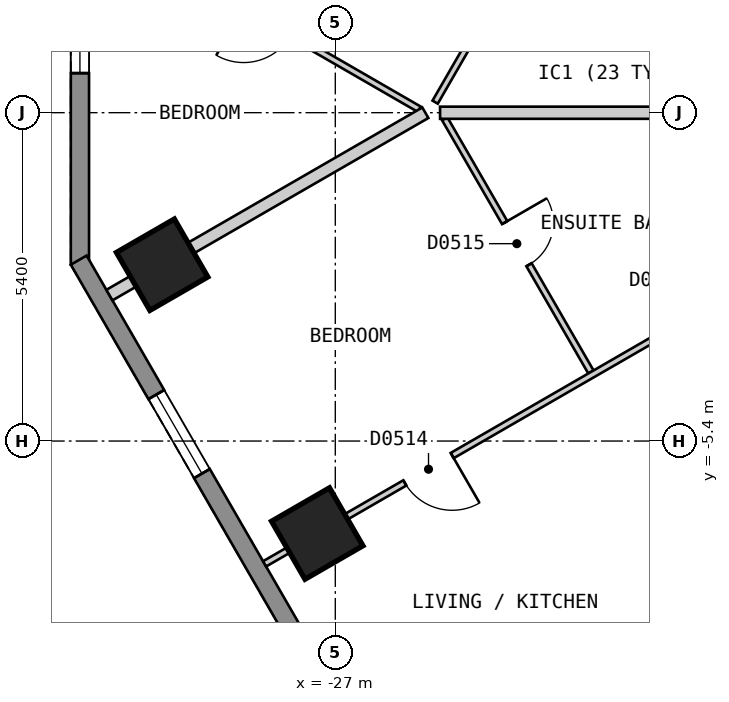
"""IFC4 building model, lengths in metres.
Left out: names, types, materials, properties, quantities, classifications, styles, units other than length and angle.
Written with IfcOpenShell. Run it as: python <this file> out.ifc"""

import sys

from ifc_helpers import new_model, si_unit, direction, frame, frame_2d, origin, origin_2d, place, context, subcontext, project, spatial, polyline, rectangle, outline, extrude, element, fill, save


model = new_model("IFC4")
c1 = context("Model", 3, precision=1e-05, world=origin(), true_north=direction((0.0, 1.0)))
c2 = subcontext(c1, "Body", "Model", "MODEL_VIEW")
j1 = project(units=[si_unit("LENGTHUNIT", "METRE"), si_unit("PLANEANGLEUNIT", "RADIAN")], contexts=[c1])
p1 = place(None, origin())
s1 = spatial("IfcSite", under=j1, at=p1, CompositionType="ELEMENT")
p2 = place(p1, origin())
s2 = spatial("IfcBuilding", under=s1, at=p2, CompositionType="ELEMENT")
p3 = place(p2, frame((0.0, 0.0, 50.4)))
s3 = spatial("IfcBuildingStorey", under=s2, at=p3, CompositionType="ELEMENT", Elevation=50.4)
for number, where, z_axis, x_axis in (
    (1, (-29.848, -2.5, 0.0), (0.0, 0.0, 1.0), (0.5, -0.866, 0.0)),
    (2, (-27.297, -6.921, 0.0), (0.0, 0.0, 1.0), (0.5, -0.866, 0.0)),
):
    element("IfcColumn", number, at=place(p3, frame(where, z_axis=z_axis, x_axis=x_axis)), inside=s3, PredefinedType="COLUMN", context=c2, shape_type="SweptSolid", body=[
        extrude(rectangle(XDim=1.1, YDim=1.1, at=origin_2d()), origin(), (0.0, 0.0, 1.0), 3.0),
    ])
p4 = place(p3, frame((-31.2, 2.5, 0.0), z_axis=(0.0, 0.0, 1.0), x_axis=(0.0, -1.0, 0.0)))
e3 = element("IfcWall", 3, at=p4, inside=s3, PredefinedType="SOLIDWALL", context=c2, shape_type="SweptSolid", body=[
    extrude(outline(polyline([(0.0, -0.15), (5.0, -0.15), (4.92, 0.15), (0.08, 0.15), (0.0, -0.15)])), origin(), (0.0, 0.0, 1.0), 2.7),
])
p5 = place(p4, frame((0.65, 0.0, 0.15)))
e4 = element("IfcOpeningElement", 4, at=p5, cuts=e3, PredefinedType="OPENING", context=c2, shape_type="SweptSolid", body=[
    extrude(rectangle(XDim=1.2, YDim=2.1, at=frame_2d((0.6, 1.05))), frame((0.0, 0.16, 0.0), z_axis=(0.0, -1.0, 0.0), x_axis=(1.0, 0.0, 0.0)), (0.0, 0.0, 1.0), 0.32),
])
p6 = place(p3, frame((-31.22, -2.425, 0.0), z_axis=(0.0, 0.0, 1.0), x_axis=(0.500001938803, -0.866024284413, 0.0)))
e5 = element("IfcWall", 5, at=p6, inside=s3, PredefinedType="SOLIDWALL", context=c2, shape_type="SweptSolid", body=[
    extrude(outline(polyline([(0.0, -0.15), (27.02, -0.15), (26.94, 0.15), (0.08, 0.15), (0.0, -0.15)])), origin(), (0.0, 0.0, 1.0), 2.7),
])
p7 = place(p6, frame((2.553, 0.0, 0.15)))
e6 = element("IfcOpeningElement", 6, at=p7, cuts=e5, PredefinedType="OPENING", context=c2, shape_type="SweptSolid", body=[
    extrude(rectangle(XDim=1.5, YDim=2.1, at=frame_2d((0.75, 1.05))), frame((0.0, 0.16, 0.0), z_axis=(0.0, -1.0, 0.0), x_axis=(1.0, 0.0, 0.0)), (0.0, 0.0, 1.0), 0.32),
])
p8 = place(p6, frame((7.657, 0.0, 0.15)))
e7 = element("IfcOpeningElement", 7, at=p8, cuts=e5, PredefinedType="OPENING", context=c2, shape_type="SweptSolid", body=[
    extrude(rectangle(XDim=1.5, YDim=2.1, at=frame_2d((0.75, 1.05))), frame((0.0, 0.16, 0.0), z_axis=(0.0, -1.0, 0.0), x_axis=(1.0, 0.0, 0.0)), (0.0, 0.0, 1.0), 0.32),
])
p9 = place(p6, frame((12.761, 0.0, 0.15)))
e8 = element("IfcOpeningElement", 8, at=p9, cuts=e5, PredefinedType="OPENING", context=c2, shape_type="SweptSolid", body=[
    extrude(rectangle(XDim=1.5, YDim=2.1, at=frame_2d((0.75, 1.05))), frame((0.0, 0.16, 0.0), z_axis=(0.0, -1.0, 0.0), x_axis=(1.0, 0.0, 0.0)), (0.0, 0.0, 1.0), 0.32),
])
p10 = place(p6, frame((17.865, 0.0, 0.15)))
e9 = element("IfcOpeningElement", 9, at=p10, cuts=e5, PredefinedType="OPENING", context=c2, shape_type="SweptSolid", body=[
    extrude(rectangle(XDim=1.5, YDim=2.1, at=frame_2d((0.75, 1.05))), frame((0.0, 0.16, 0.0), z_axis=(0.0, -1.0, 0.0), x_axis=(1.0, 0.0, 0.0)), (0.0, 0.0, 1.0), 0.32),
])
p11 = place(p6, frame((22.969, 0.0, 0.15)))
e10 = element("IfcOpeningElement", 10, at=p11, cuts=e5, PredefinedType="OPENING", context=c2, shape_type="SweptSolid", body=[
    extrude(rectangle(XDim=1.5, YDim=2.1, at=frame_2d((0.75, 1.05))), frame((0.0, 0.16, 0.0), z_axis=(0.0, -1.0, 0.0), x_axis=(1.0, 0.0, 0.0)), (0.0, 0.0, 1.0), 0.32),
])
p12 = place(p3, frame((-25.2, -0.101, 0.0), z_axis=(0.0, 0.0, 1.0), x_axis=(0.500099052605, -0.865968208183, 0.0)))
e11 = element("IfcWall", 11, at=p12, inside=s3, PredefinedType="PARTITIONING", context=c2, shape_type="SweptSolid", body=[
    extrude(rectangle(XDim=4.807, YDim=0.1, at=frame_2d((2.404, 0.0))), origin(), (0.0, 0.0, 1.0), 2.7),
])
p13 = place(p12, frame((1.971, 0.0, 0.0)))
e12 = element("IfcOpeningElement", 12, at=p13, cuts=e11, PredefinedType="OPENING", context=c2, shape_type="SweptSolid", body=[
    extrude(rectangle(XDim=0.8, YDim=2.1, at=frame_2d((0.4, 1.05))), frame((0.0, 0.06, 0.0), z_axis=(0.0, -1.0, 0.0), x_axis=(1.0, 0.0, 0.0)), (0.0, 0.0, 1.0), 0.12),
])
p14 = place(p3, frame((-30.716, 2.999, 0.0), z_axis=(0.0, 0.0, 1.0), x_axis=(0.866025981722, -0.499998998981, 0.0)))
e13 = element("IfcWall", 13, at=p14, inside=s3, PredefinedType="PARTITIONING", context=c2, shape_type="SweptSolid", body=[
    extrude(rectangle(XDim=5.884, YDim=0.1, at=frame_2d((2.942, 0.0))), origin(), (0.0, 0.0, 1.0), 2.7),
])
p15 = place(p14, frame((2.55, 0.0, 0.0)))
e14 = element("IfcOpeningElement", 14, at=p15, cuts=e13, PredefinedType="OPENING", context=c2, shape_type="SweptSolid", body=[
    extrude(rectangle(XDim=0.9, YDim=2.1, at=frame_2d((0.45, 1.05))), frame((0.0, 0.06, 0.0), z_axis=(0.0, -1.0, 0.0), x_axis=(1.0, 0.0, 0.0)), (0.0, 0.0, 1.0), 0.12),
])
p16 = place(p3, frame((-25.358, 0.173, 0.0), z_axis=(0.0, 0.0, 1.0), x_axis=(0.500180754623, 0.8659210199, 0.0)))
e15 = element("IfcWall", 15, at=p16, inside=s3, PredefinedType="PARTITIONING", context=c2, shape_type="SweptSolid", body=[
    extrude(rectangle(XDim=4.872, YDim=0.1, at=frame_2d((2.436, 0.0))), origin(), (0.0, 0.0, 1.0), 2.7),
])
p17 = place(p16, frame((1.936, 0.0, 0.0)))
e16 = element("IfcOpeningElement", 16, at=p17, cuts=e15, PredefinedType="OPENING", context=c2, shape_type="SweptSolid", body=[
    extrude(rectangle(XDim=0.8, YDim=2.1, at=frame_2d((0.4, 1.05))), frame((0.0, 0.06, 0.0), z_axis=(0.0, -1.0, 0.0), x_axis=(1.0, 0.0, 0.0)), (0.0, 0.0, 1.0), 0.12),
])
p18 = place(p3, frame((-28.163, -7.42, 0.0), z_axis=(0.0, 0.0, 1.0), x_axis=(0.866065245018, 0.499930986609, 0.0)))
e17 = element("IfcWall", 17, at=p18, inside=s3, PredefinedType="PARTITIONING", context=c2, shape_type="SweptSolid", body=[
    extrude(rectangle(XDim=10.0, YDim=0.1, at=frame_2d((5.0, 0.0))), origin(), (0.0, 0.0, 1.0), 2.7),
])
p19 = place(p18, frame((2.663, 0.0, 0.0)))
e18 = element("IfcOpeningElement", 18, at=p19, cuts=e17, PredefinedType="OPENING", context=c2, shape_type="SweptSolid", body=[
    extrude(rectangle(XDim=0.9, YDim=2.1, at=frame_2d((0.45, 1.05))), frame((0.0, 0.06, 0.0), z_axis=(0.0, -1.0, 0.0), x_axis=(1.0, 0.0, 0.0)), (0.0, 0.0, 1.0), 0.12),
])
p20 = place(p3, frame((-25.277, -0.001, 0.0), z_axis=(0.0, 0.0, 1.0), x_axis=(1.0, 0.0, 0.0)))
e19 = element("IfcWall", 19, at=p20, inside=s3, PredefinedType="PARTITIONING", context=c2, shape_type="SweptSolid", body=[
    extrude(rectangle(XDim=4.493, YDim=0.2, at=frame_2d((2.247, 0.0))), origin(), (0.0, 0.0, 1.0), 2.7),
])
p21 = place(p3, frame((-30.715, -3.0, 0.0), z_axis=(0.0, 0.0, 1.0), x_axis=(0.86609140076, 0.499885672459, 0.0)))
e20 = element("IfcWall", 20, at=p21, inside=s3, PredefinedType="PARTITIONING", context=c2, shape_type="SweptSolid", body=[
    extrude(rectangle(XDim=6.0, YDim=0.2, at=frame_2d((3.0, 0.0))), origin(), (0.0, 0.0, 1.0), 2.7),
])
p22 = place(p3, frame((-25.61, -11.841, 0.0), z_axis=(0.0, 0.0, 1.0), x_axis=(0.866004715254, 0.500035831874, 0.0)))
e21 = element("IfcWall", 21, at=p22, inside=s3, PredefinedType="PARTITIONING", context=c2, shape_type="SweptSolid", body=[
    extrude(rectangle(XDim=8.43, YDim=0.2, at=frame_2d((4.215, 0.0))), origin(), (0.0, 0.0, 1.0), 2.7),
])
p23 = place(p5, origin())
e22 = element("IfcWindow", 22, at=p23, inside=s3, PartitioningType="SINGLE_PANEL", PredefinedType="WINDOW", context=c2, shape_type="SweptSolid", body=[
    extrude(rectangle(XDim=1.2, YDim=2.1, at=frame_2d((0.6, 1.05))), frame((0.0, 0.03, 0.0), z_axis=(0.0, -1.0, 0.0), x_axis=(1.0, 0.0, 0.0)), (0.0, 0.0, 1.0), 0.06),
])
fill(e4, e22)
p24 = place(p7, origin())
e23 = element("IfcWindow", 23, at=p24, inside=s3, PartitioningType="SINGLE_PANEL", PredefinedType="WINDOW", context=c2, shape_type="SweptSolid", body=[
    extrude(rectangle(XDim=1.5, YDim=2.1, at=frame_2d((0.75, 1.05))), frame((0.0, 0.03, 0.0), z_axis=(0.0, -1.0, 0.0), x_axis=(1.0, 0.0, 0.0)), (0.0, 0.0, 1.0), 0.06),
])
fill(e6, e23)
p25 = place(p19, origin())
e24 = element("IfcDoor", 24, at=p25, inside=s3, OperationType="SINGLE_SWING_RIGHT", PredefinedType="DOOR", context=c2, shape_type="SweptSolid", body=[
    extrude(rectangle(XDim=0.9, YDim=2.1, at=frame_2d((0.45, 1.05))), frame((0.0, 0.025, 0.0), z_axis=(0.0, -1.0, 0.0), x_axis=(1.0, 0.0, 0.0)), (0.0, 0.0, 1.0), 0.05),
])
fill(e18, e24)
p26 = place(p13, origin())
e25 = element("IfcDoor", 25, at=p26, inside=s3, OperationType="SINGLE_SWING_LEFT", PredefinedType="DOOR", context=c2, shape_type="SweptSolid", body=[
    extrude(rectangle(XDim=0.8, YDim=2.1, at=frame_2d((0.4, 1.05))), frame((0.0, 0.025, 0.0), z_axis=(0.0, -1.0, 0.0), x_axis=(1.0, 0.0, 0.0)), (0.0, 0.0, 1.0), 0.05),
])
fill(e12, e25)
save(model, sys.argv[1])
